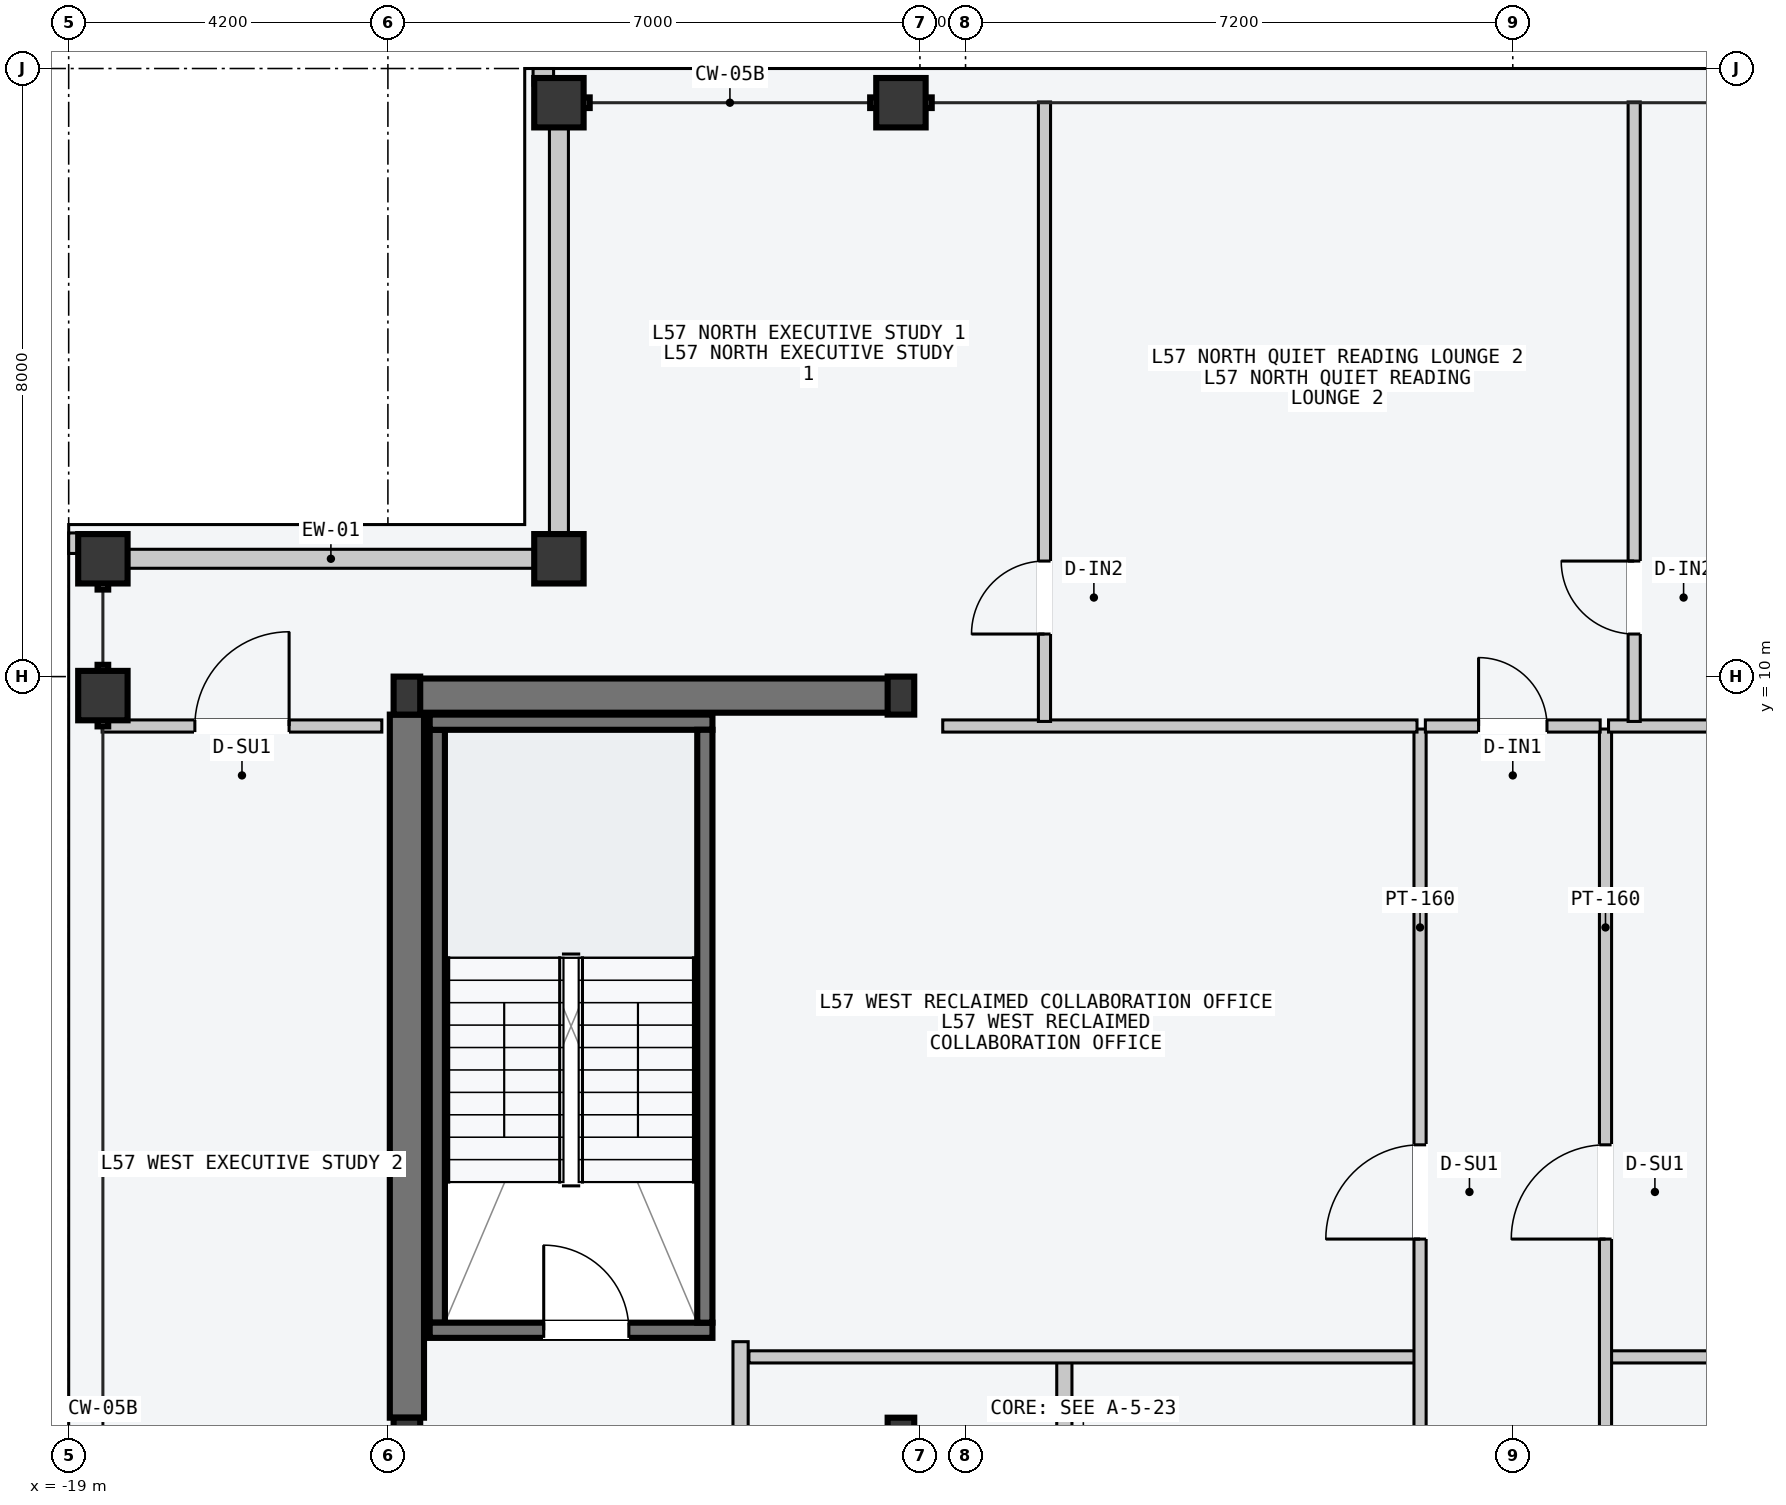
"""IFC4 building model, lengths in metres.
Left out: names, types, materials, properties, quantities, classifications, styles, units other than length and angle.
Written with IfcOpenShell. Run it as: python <this file> out.ifc"""

import sys

from ifc_helpers import new_model, si_unit, direction, frame, frame_2d, origin, origin_2d, place, context, subcontext, project, spatial, rectangle, hollow_rectangle, i_section, extrude, element, fill, save


model = new_model("IFC4")
c1 = context("Model", 3, precision=1e-05, world=origin(), true_north=direction((0.0, 1.0)))
c2 = subcontext(c1, "Body", "Model", "MODEL_VIEW")
j1 = project(units=[si_unit("LENGTHUNIT", "METRE"), si_unit("PLANEANGLEUNIT", "RADIAN")], contexts=[c1])
p1 = place(None, origin())
s1 = spatial("IfcSite", under=j1, at=p1, CompositionType="ELEMENT")
p2 = place(p1, origin())
s2 = spatial("IfcBuilding", under=s1, at=p2, CompositionType="ELEMENT")
p3 = place(p2, frame((0.0, 0.0, 218.4)))
s3 = spatial("IfcBuildingStorey", under=s2, at=p3, CompositionType="ELEMENT", Elevation=218.4)
p4 = place(p3, frame((-14.53, 9.75, -0.2), z_axis=(0.0, 0.0, 1.0), x_axis=(1.0, 0.0, 0.0)))
e1 = element("IfcWall", 1, at=p4, inside=s3, PredefinedType="SHEAR", context=c2, shape_type="SweptSolid", body=[
    extrude(rectangle(XDim=6.46, YDim=0.45, at=frame_2d((3.23, 0.0))), origin(), (0.0, 0.0, 1.0), 3.6),
])
p5 = place(p3, frame((-14.55, 0.25, -0.2), z_axis=(0.0, 0.0, 1.0), x_axis=(0.0, 1.0, 0.0)))
e2 = element("IfcWall", 2, at=p5, inside=s3, PredefinedType="SHEAR", context=c2, shape_type="SweptSolid", body=[
    extrude(rectangle(XDim=9.25, YDim=0.45, at=frame_2d((4.625, 0.0))), origin(), (0.0, 0.0, 1.0), 3.6),
])
p6 = place(p3, frame((-14.15, 1.5, -0.2), z_axis=(0.0, 0.0, 1.0), x_axis=(0.0, 1.0, 0.0)))
e3 = element("IfcWall", 3, at=p6, inside=s3, PredefinedType="SOLIDWALL", context=c2, shape_type="SweptSolid", body=[
    extrude(rectangle(XDim=7.8, YDim=0.2, at=frame_2d((3.9, 0.0))), origin(), (0.0, 0.0, 1.0), 3.6),
])
p7 = place(p3, frame((-14.25, 1.4, -0.2), z_axis=(0.0, 0.0, 1.0), x_axis=(1.0, 0.0, 0.0)))
e4 = element("IfcWall", 4, at=p7, inside=s3, PredefinedType="SOLIDWALL", context=c2, shape_type="SweptSolid", body=[
    extrude(rectangle(XDim=3.72, YDim=0.2, at=frame_2d((1.86, 0.0))), origin(), (0.0, 0.0, 1.0), 3.6),
])
p8 = place(p7, frame((1.5, 0.0, 0.2)))
e5 = element("IfcOpeningElement", 5, at=p8, cuts=e4, PredefinedType="OPENING", context=c2, shape_type="SweptSolid", body=[
    extrude(rectangle(XDim=1.12, YDim=2.18, at=frame_2d((0.56, 1.09))), frame((0.0, 0.11, 0.0), z_axis=(0.0, -1.0, 0.0), x_axis=(1.0, 0.0, 0.0)), (0.0, 0.0, 1.0), 0.22),
])
p9 = place(p3, frame((-14.25, 9.4, -0.2), z_axis=(0.0, 0.0, 1.0), x_axis=(1.0, 0.0, 0.0)))
e6 = element("IfcWall", 6, at=p9, inside=s3, PredefinedType="SOLIDWALL", context=c2, shape_type="SweptSolid", body=[
    extrude(rectangle(XDim=3.72, YDim=0.2, at=frame_2d((1.86, 0.0))), origin(), (0.0, 0.0, 1.0), 3.6),
])
p10 = place(p3, frame((-10.63, 1.5, -0.2), z_axis=(0.0, 0.0, 1.0), x_axis=(0.0, 1.0, 0.0)))
e7 = element("IfcWall", 7, at=p10, inside=s3, PredefinedType="SOLIDWALL", context=c2, shape_type="SweptSolid", body=[
    extrude(rectangle(XDim=7.8, YDim=0.2, at=frame_2d((3.9, 0.0))), origin(), (0.0, 0.0, 1.0), 3.6),
])
for number, where, z_axis, x_axis in (
    (8, (-14.55, 0.0, 0.0), (0.0, 0.0, 1.0), (1.0, 0.0, 0.0)),
    (9, (-14.55, 9.75, 0.0), (0.0, 0.0, 1.0), (1.0, 0.0, 0.0)),
    (10, (-8.05, 0.0, 0.0), (0.0, 0.0, 1.0), (1.0, 0.0, 0.0)),
    (11, (-8.05, 9.75, 0.0), (0.0, 0.0, 1.0), (1.0, 0.0, 0.0)),
):
    element("IfcColumn", number, at=place(p3, frame(where, z_axis=z_axis, x_axis=x_axis)), inside=s3, PredefinedType="COLUMN", context=c2, shape_type="SweptSolid", body=[
        extrude(i_section(OverallWidth=0.35, OverallDepth=0.5, WebThickness=0.02, FlangeThickness=0.032, at=origin_2d()), origin(), (0.0, 0.0, 1.0), 3.6),
    ])
for number, where, z_axis, x_axis in (
    (12, (-12.55, 17.55, 0.0), (0.0, 0.0, 1.0), (1.0, 0.0, 0.0)),
    (13, (-8.05, 17.55, 0.0), (0.0, 0.0, 1.0), (1.0, 0.0, 0.0)),
    (14, (-18.55, 9.75, 0.0), (0.0, 0.0, 1.0), (0.0, 1.0, 0.0)),
    (15, (-18.55, 11.55, 0.0), (0.0, 0.0, 1.0), (0.0, 1.0, 0.0)),
    (16, (-12.55, 11.55, 0.0), (0.0, 0.0, 1.0), (1.0, 0.0, 0.0)),
):
    element("IfcColumn", number, at=place(p3, frame(where, z_axis=z_axis, x_axis=x_axis)), inside=s3, PredefinedType="COLUMN", context=c2, shape_type="SweptSolid", body=[
        extrude(hollow_rectangle(XDim=0.65, YDim=0.65, WallThickness=0.028, at=origin_2d()), origin(), (0.0, 0.0, 1.0), 3.6),
    ])
for number, where, z_axis, x_axis in (
    (17, (-18.215, 11.55, 0.0), (0.0, 0.0, 1.0), (1.0, 0.0, 0.0)),
    (18, (-12.55, 11.885, 0.0), (0.0, 0.0, 1.0), (0.0, 1.0, 0.0)),
):
    element("IfcWall", number, at=place(p3, frame(where, z_axis=z_axis, x_axis=x_axis)), inside=s3, PredefinedType="STANDARD", context=c2, shape_type="SweptSolid", body=[
        extrude(rectangle(XDim=5.33, YDim=0.25, at=frame_2d((2.665, 0.0))), origin(), (0.0, 0.0, 1.0), 2.85),
    ])
for number, where, z_axis, x_axis in (
    (19, (-12.89, 17.89, 0.0), (0.0, 0.0, 1.0), (1.0, 0.0, 0.0)),
    (20, (-18.89, 11.62, 0.0), (0.0, 0.0, 1.0), (0.0, 1.0, 0.0)),
):
    element("IfcWall", number, at=place(p3, frame(where, z_axis=z_axis, x_axis=x_axis)), inside=s3, PredefinedType="PARAPET", context=c2, shape_type="SweptSolid", body=[
        extrude(rectangle(XDim=0.27, YDim=0.22, at=frame_2d((0.135, 0.0))), origin(), (0.0, 0.0, 1.0), 1.2),
    ])
p11 = place(p3, frame((-5.9, -9.45, 0.0), z_axis=(0.0, 0.0, 1.0), x_axis=(0.0, 1.0, 0.0)))
e21 = element("IfcWall", 21, at=p11, inside=s3, PredefinedType="PARTITIONING", context=c2, shape_type="SweptSolid", body=[
    extrude(rectangle(XDim=10.5, YDim=0.2, at=frame_2d((5.25, 0.0))), origin(), (0.0, 0.0, 1.0), 3.4),
])
p12 = place(p11, frame((3.9, 0.0, 0.0)))
e22 = element("IfcOpeningElement", 22, at=p12, cuts=e21, PredefinedType="OPENING", context=c2, shape_type="SweptSolid", body=[
    extrude(rectangle(XDim=1.5, YDim=2.2, at=frame_2d((0.75, 1.1))), frame((0.0, 0.11, 0.0), z_axis=(0.0, -1.0, 0.0), x_axis=(1.0, 0.0, 0.0)), (0.0, 0.0, 1.0), 0.22),
])
p13 = place(p3, frame((-10.16, -2.55, 0.0), z_axis=(0.0, 0.0, 1.0), x_axis=(0.0, 1.0, 0.0)))
e23 = element("IfcWall", 23, at=p13, inside=s3, PredefinedType="PARTITIONING", context=c2, shape_type="SweptSolid", body=[
    extrude(rectangle(XDim=3.8, YDim=0.2, at=frame_2d((1.9, 0.0))), origin(), (0.0, 0.0, 1.0), 3.4),
])
p14 = place(p13, frame((1.3, 0.0, 0.0)))
e24 = element("IfcOpeningElement", 24, at=p14, cuts=e23, PredefinedType="OPENING", context=c2, shape_type="SweptSolid", body=[
    extrude(rectangle(XDim=1.1, YDim=2.15, at=frame_2d((0.55, 1.075))), frame((0.0, 0.11, 0.0), z_axis=(0.0, -1.0, 0.0), x_axis=(1.0, 0.0, 0.0)), (0.0, 0.0, 1.0), 0.22),
])
p15 = place(p3, frame((-10.05, 1.05, 0.0), z_axis=(0.0, 0.0, 1.0), x_axis=(1.0, 0.0, 0.0)))
e25 = element("IfcWall", 25, at=p15, inside=s3, PredefinedType="PARTITIONING", context=c2, shape_type="SweptSolid", body=[
    extrude(rectangle(XDim=8.79, YDim=0.16, at=frame_2d((4.395, 0.0))), origin(), (0.0, 0.0, 1.0), 3.4),
])
p16 = place(p3, frame((-1.22, -3.5, 0.0), z_axis=(0.0, 0.0, 1.0), x_axis=(0.0, 1.0, 0.0)))
e26 = element("IfcWall", 26, at=p16, inside=s3, PredefinedType="PARTITIONING", context=c2, shape_type="SweptSolid", body=[
    extrude(rectangle(XDim=12.81, YDim=0.16, at=frame_2d((6.405, 0.0))), origin(), (0.0, 0.0, 1.0), 3.4),
])
p17 = place(p16, frame((6.1, 0.0, 0.0)))
e27 = element("IfcOpeningElement", 27, at=p17, cuts=e26, PredefinedType="OPENING", context=c2, shape_type="SweptSolid", body=[
    extrude(rectangle(XDim=1.24, YDim=2.24, at=frame_2d((0.62, 1.12))), frame((0.0, 0.09, 0.0), z_axis=(0.0, -1.0, 0.0), x_axis=(1.0, 0.0, 0.0)), (0.0, 0.0, 1.0), 0.18),
])
p18 = place(p16, frame((1.6, 0.0, 0.0)))
e28 = element("IfcOpeningElement", 28, at=p18, cuts=e26, PredefinedType="OPENING", context=c2, shape_type="SweptSolid", body=[
    extrude(rectangle(XDim=0.96, YDim=2.18, at=frame_2d((0.48, 1.09))), frame((0.0, 0.09, 0.0), z_axis=(0.0, -1.0, 0.0), x_axis=(1.0, 0.0, 0.0)), (0.0, 0.0, 1.0), 0.18),
])
p19 = place(p3, frame((-7.5, 9.35, 0.0), z_axis=(0.0, 0.0, 1.0), x_axis=(1.0, 0.0, 0.0)))
e29 = element("IfcWall", 29, at=p19, inside=s3, PredefinedType="PARTITIONING", context=c2, shape_type="SweptSolid", body=[
    extrude(rectangle(XDim=6.24, YDim=0.16, at=frame_2d((3.12, 0.0))), origin(), (0.0, 0.0, 1.0), 3.4),
])
p20 = place(p3, frame((1.26, 1.05, 0.0), z_axis=(0.0, 0.0, 1.0), x_axis=(1.0, 0.0, 0.0)))
e30 = element("IfcWall", 30, at=p20, inside=s3, PredefinedType="PARTITIONING", context=c2, shape_type="SweptSolid", body=[
    extrude(rectangle(XDim=8.8, YDim=0.16, at=frame_2d((4.4, 0.0))), origin(), (0.0, 0.0, 1.0), 3.4),
])
p21 = place(p3, frame((1.22, -3.5, 0.0), z_axis=(0.0, 0.0, 1.0), x_axis=(0.0, 1.0, 0.0)))
e31 = element("IfcWall", 31, at=p21, inside=s3, PredefinedType="PARTITIONING", context=c2, shape_type="SweptSolid", body=[
    extrude(rectangle(XDim=12.81, YDim=0.16, at=frame_2d((6.405, 0.0))), origin(), (0.0, 0.0, 1.0), 3.4),
])
p22 = place(p21, frame((6.1, 0.0, 0.0)))
e32 = element("IfcOpeningElement", 32, at=p22, cuts=e31, PredefinedType="OPENING", context=c2, shape_type="SweptSolid", body=[
    extrude(rectangle(XDim=1.24, YDim=2.24, at=frame_2d((0.62, 1.12))), frame((0.0, 0.09, 0.0), z_axis=(0.0, -1.0, 0.0), x_axis=(1.0, 0.0, 0.0)), (0.0, 0.0, 1.0), 0.18),
])
p23 = place(p21, frame((1.6, 0.0, 0.0)))
e33 = element("IfcOpeningElement", 33, at=p23, cuts=e31, PredefinedType="OPENING", context=c2, shape_type="SweptSolid", body=[
    extrude(rectangle(XDim=0.96, YDim=2.18, at=frame_2d((0.48, 1.09))), frame((0.0, 0.09, 0.0), z_axis=(0.0, -1.0, 0.0), x_axis=(1.0, 0.0, 0.0)), (0.0, 0.0, 1.0), 0.18),
])
p24 = place(p3, frame((1.26, 9.35, 0.0), z_axis=(0.0, 0.0, 1.0), x_axis=(1.0, 0.0, 0.0)))
e34 = element("IfcWall", 34, at=p24, inside=s3, PredefinedType="PARTITIONING", context=c2, shape_type="SweptSolid", body=[
    extrude(rectangle(XDim=6.24, YDim=0.16, at=frame_2d((3.12, 0.0))), origin(), (0.0, 0.0, 1.0), 3.4),
])
p25 = place(p3, frame((-6.161, 9.41, 0.0), z_axis=(0.0, 0.0, 1.0), x_axis=(0.0, 1.0, 0.0)))
e35 = element("IfcWall", 35, at=p25, inside=s3, PredefinedType="PARTITIONING", context=c2, shape_type="SweptSolid", body=[
    extrude(rectangle(XDim=8.15, YDim=0.16, at=frame_2d((4.075, 0.0))), origin(), (0.0, 0.0, 1.0), 3.4),
])
p26 = place(p25, frame((1.15, 0.0, 0.0)))
e36 = element("IfcOpeningElement", 36, at=p26, cuts=e35, PredefinedType="OPENING", context=c2, shape_type="SweptSolid", body=[
    extrude(rectangle(XDim=0.96, YDim=2.18, at=frame_2d((0.48, 1.09))), frame((0.0, 0.09, 0.0), z_axis=(0.0, -1.0, 0.0), x_axis=(1.0, 0.0, 0.0)), (0.0, 0.0, 1.0), 0.18),
])
p27 = place(p3, frame((1.597, 9.41, 0.0), z_axis=(0.0, 0.0, 1.0), x_axis=(0.0, 1.0, 0.0)))
e37 = element("IfcWall", 37, at=p27, inside=s3, PredefinedType="PARTITIONING", context=c2, shape_type="SweptSolid", body=[
    extrude(rectangle(XDim=8.15, YDim=0.16, at=frame_2d((4.075, 0.0))), origin(), (0.0, 0.0, 1.0), 3.4),
])
p28 = place(p27, frame((1.15, 0.0, 0.0)))
e38 = element("IfcOpeningElement", 38, at=p28, cuts=e37, PredefinedType="OPENING", context=c2, shape_type="SweptSolid", body=[
    extrude(rectangle(XDim=0.96, YDim=2.18, at=frame_2d((0.48, 1.09))), frame((0.0, 0.09, 0.0), z_axis=(0.0, -1.0, 0.0), x_axis=(1.0, 0.0, 0.0)), (0.0, 0.0, 1.0), 0.18),
])
p29 = place(p3, frame((-1.15, 9.35, 0.0), z_axis=(0.0, 0.0, 1.0), x_axis=(1.0, 0.0, 0.0)))
e39 = element("IfcWall", 39, at=p29, inside=s3, PredefinedType="PARTITIONING", context=c2, shape_type="SweptSolid", body=[
    extrude(rectangle(XDim=2.3, YDim=0.16, at=frame_2d((1.15, 0.0))), origin(), (0.0, 0.0, 1.0), 3.4),
])
p30 = place(p29, frame((0.7, 0.0, 0.0)))
e40 = element("IfcOpeningElement", 40, at=p30, cuts=e39, PredefinedType="OPENING", context=c2, shape_type="SweptSolid", body=[
    extrude(rectangle(XDim=0.9, YDim=2.15, at=frame_2d((0.45, 1.075))), frame((0.0, 0.09, 0.0), z_axis=(0.0, -1.0, 0.0), x_axis=(1.0, 0.0, 0.0)), (0.0, 0.0, 1.0), 0.18),
])
p31 = place(p3, frame((-18.56, 9.35, 0.0), z_axis=(0.0, 0.0, 1.0), x_axis=(1.0, 0.0, 0.0)))
e41 = element("IfcWall", 41, at=p31, inside=s3, PredefinedType="PARTITIONING", context=c2, shape_type="SweptSolid", body=[
    extrude(rectangle(XDim=3.68, YDim=0.16, at=frame_2d((1.84, 0.0))), origin(), (0.0, 0.0, 1.0), 3.4),
])
p32 = place(p31, frame((1.22, 0.0, 0.0)))
e42 = element("IfcOpeningElement", 42, at=p32, cuts=e41, PredefinedType="OPENING", context=c2, shape_type="SweptSolid", body=[
    extrude(rectangle(XDim=1.24, YDim=2.24, at=frame_2d((0.62, 1.12))), frame((0.0, 0.09, 0.0), z_axis=(0.0, -1.0, 0.0), x_axis=(1.0, 0.0, 0.0)), (0.0, 0.0, 1.0), 0.18),
])
p33 = place(p8, origin())
e43 = element("IfcDoor", 43, at=p33, inside=s3, OperationType="SINGLE_SWING_LEFT", PredefinedType="DOOR", context=c2, shape_type="SweptSolid", body=[
    extrude(rectangle(XDim=1.12, YDim=2.18, at=frame_2d((0.56, 1.09))), frame((0.0, 0.025, 0.0), z_axis=(0.0, -1.0, 0.0), x_axis=(1.0, 0.0, 0.0)), (0.0, 0.0, 1.0), 0.05),
])
fill(e5, e43)
p34 = place(p17, origin())
e44 = element("IfcDoor", 44, at=p34, inside=s3, OperationType="SINGLE_SWING_LEFT", PredefinedType="DOOR", context=c2, shape_type="SweptSolid", body=[
    extrude(rectangle(XDim=1.24, YDim=2.24, at=frame_2d((0.62, 1.12))), frame((0.0, 0.025, 0.0), z_axis=(0.0, -1.0, 0.0), x_axis=(1.0, 0.0, 0.0)), (0.0, 0.0, 1.0), 0.05),
])
fill(e27, e44)
p35 = place(p22, origin())
e45 = element("IfcDoor", 45, at=p35, inside=s3, OperationType="SINGLE_SWING_LEFT", PredefinedType="DOOR", context=c2, shape_type="SweptSolid", body=[
    extrude(rectangle(XDim=1.24, YDim=2.24, at=frame_2d((0.62, 1.12))), frame((0.0, 0.025, 0.0), z_axis=(0.0, -1.0, 0.0), x_axis=(1.0, 0.0, 0.0)), (0.0, 0.0, 1.0), 0.05),
])
fill(e32, e45)
p36 = place(p26, origin())
e46 = element("IfcDoor", 46, at=p36, inside=s3, OperationType="SINGLE_SWING_LEFT", PredefinedType="DOOR", context=c2, shape_type="SweptSolid", body=[
    extrude(rectangle(XDim=0.96, YDim=2.18, at=frame_2d((0.48, 1.09))), frame((0.0, 0.025, 0.0), z_axis=(0.0, -1.0, 0.0), x_axis=(1.0, 0.0, 0.0)), (0.0, 0.0, 1.0), 0.05),
])
fill(e36, e46)
p37 = place(p28, origin())
e47 = element("IfcDoor", 47, at=p37, inside=s3, OperationType="SINGLE_SWING_RIGHT", PredefinedType="DOOR", context=c2, shape_type="SweptSolid", body=[
    extrude(rectangle(XDim=0.96, YDim=2.18, at=frame_2d((0.48, 1.09))), frame((0.0, 0.025, 0.0), z_axis=(0.0, -1.0, 0.0), x_axis=(1.0, 0.0, 0.0)), (0.0, 0.0, 1.0), 0.05),
])
fill(e38, e47)
p38 = place(p30, origin())
e48 = element("IfcDoor", 48, at=p38, inside=s3, OperationType="SINGLE_SWING_LEFT", PredefinedType="DOOR", context=c2, shape_type="SweptSolid", body=[
    extrude(rectangle(XDim=0.9, YDim=2.15, at=frame_2d((0.45, 1.075))), frame((0.0, 0.025, 0.0), z_axis=(0.0, -1.0, 0.0), x_axis=(1.0, 0.0, 0.0)), (0.0, 0.0, 1.0), 0.05),
])
fill(e40, e48)
p39 = place(p32, origin())
e49 = element("IfcDoor", 49, at=p39, inside=s3, OperationType="SINGLE_SWING_RIGHT", PredefinedType="DOOR", context=c2, shape_type="SweptSolid", body=[
    extrude(rectangle(XDim=1.24, YDim=2.24, at=frame_2d((0.62, 1.12))), frame((0.0, 0.025, 0.0), z_axis=(0.0, -1.0, 0.0), x_axis=(1.0, 0.0, 0.0)), (0.0, 0.0, 1.0), 0.05),
])
fill(e42, e49)
save(model, sys.argv[1])
